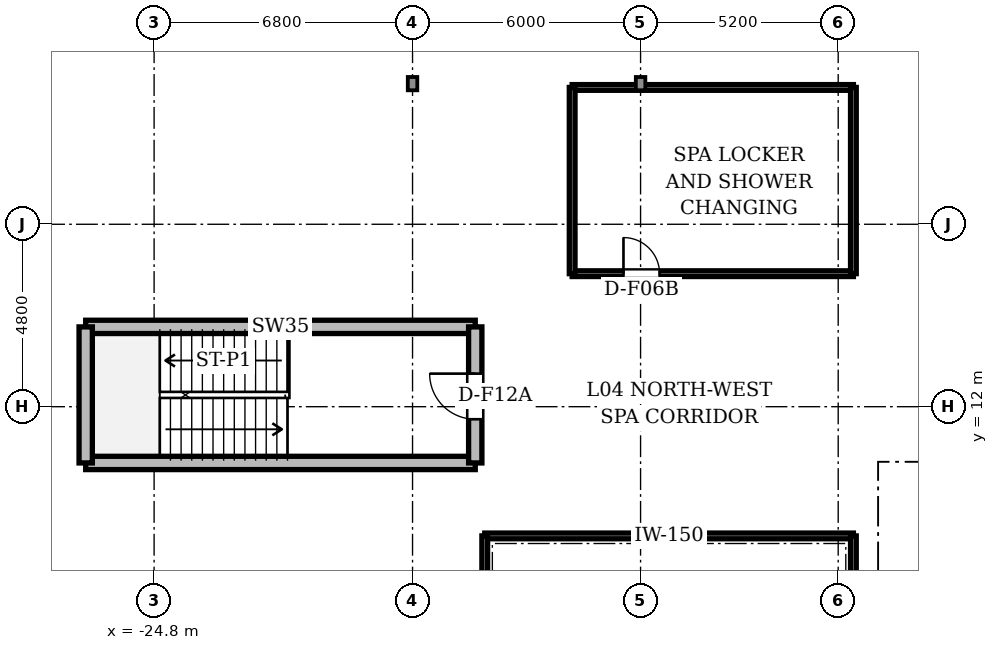
"""IFC4 building model, lengths in metres.
Left out: names, types, materials, properties, quantities, classifications, styles, units other than length and angle.
Written with IfcOpenShell. Run it as: python <this file> out.ifc"""

import sys

from ifc_helpers import new_model, si_unit, direction, frame, frame_2d, origin, origin_2d, place, context, subcontext, project, spatial, rectangle, i_section, extrude, source, transform, mapped, element, fill, save


model = new_model("IFC4")
c1 = context("Model", 3, precision=1e-05, world=origin(), true_north=direction((0.0, 1.0)))
c2 = subcontext(c1, "Body", "Model", "MODEL_VIEW")
j1 = project(units=[si_unit("LENGTHUNIT", "METRE"), si_unit("PLANEANGLEUNIT", "RADIAN")], contexts=[c1])
p1 = place(None, origin())
s1 = spatial("IfcSite", under=j1, at=p1, CompositionType="ELEMENT")
p2 = place(p1, origin())
s2 = spatial("IfcBuilding", under=s1, at=p2, CompositionType="ELEMENT")
p3 = place(p2, frame((0.0, 0.0, 18.6)))
s3 = spatial("IfcBuildingStorey", under=s2, at=p3, CompositionType="ELEMENT", Elevation=18.6)
m1 = source(origin(), c2, "Body", "SweptSolid", [
    extrude(i_section(OverallWidth=0.25, OverallDepth=0.35, WebThickness=0.012, FlangeThickness=0.012, FilletRadius=0.012, at=origin_2d()), origin(), (0.0, 0.0, 1.0), 4.26),
])
for number, where, z_axis, x_axis in (
    (1, (-18.0, 20.5, 0.0), (0.0, 0.0, 1.0), (1.0, 0.0, 0.0)),
    (2, (-12.0, 20.5, 0.0), (0.0, 0.0, 1.0), (1.0, 0.0, 0.0)),
):
    element("IfcColumn", number, at=place(p3, frame(where, z_axis=z_axis, x_axis=x_axis)), inside=s3, PredefinedType="COLUMN", context=c2, shape_type="MappedRepresentation", body=[
        mapped(m1, transform((0.0, 0.0, 0.0), scale=1.0)),
    ])
for number, where, z_axis, x_axis in (
    (3, (-26.6, 14.1, 0.0), (0.0, 0.0, 1.0), (1.0, 0.0, 0.0)),
    (4, (-26.6, 10.52, 0.0), (0.0, 0.0, 1.0), (1.0, 0.0, 0.0)),
):
    element("IfcWall", number, at=place(p3, frame(where, z_axis=z_axis, x_axis=x_axis)), inside=s3, PredefinedType="SHEAR", context=c2, shape_type="SweptSolid", body=[
        extrude(rectangle(XDim=10.25, YDim=0.35, at=frame_2d((5.125, 0.0))), origin(), (0.0, 0.0, 1.0), 4.26),
    ])
p4 = place(p3, frame((-26.6, 10.52, 0.0), z_axis=(0.0, 0.0, 1.0), x_axis=(0.0, 1.0, 0.0)))
e5 = element("IfcWall", 5, at=p4, inside=s3, PredefinedType="SHEAR", context=c2, shape_type="SweptSolid", body=[
    extrude(rectangle(XDim=3.58, YDim=0.35, at=frame_2d((1.79, 0.0))), origin(), (0.0, 0.0, 1.0), 4.26),
])
p5 = place(p3, frame((-16.35, 10.52, 0.0), z_axis=(0.0, 0.0, 1.0), x_axis=(0.0, 1.0, 0.0)))
e6 = element("IfcWall", 6, at=p5, inside=s3, PredefinedType="SHEAR", context=c2, shape_type="SweptSolid", body=[
    extrude(rectangle(XDim=3.58, YDim=0.35, at=frame_2d((1.79, 0.0))), origin(), (0.0, 0.0, 1.0), 4.26),
])
p6 = place(p5, frame((1.15, 0.0, 0.0)))
e7 = element("IfcOpeningElement", 7, at=p6, cuts=e6, PredefinedType="OPENING", context=c2, shape_type="SweptSolid", body=[
    extrude(rectangle(XDim=1.2, YDim=2.2, at=frame_2d((0.6, 1.1))), frame((0.0, 0.185, 0.0), z_axis=(0.0, -1.0, 0.0), x_axis=(1.0, 0.0, 0.0)), (0.0, 0.0, 1.0), 0.37),
])
p7 = place(p3, frame((-16.1, 8.6, 0.0), z_axis=(0.0, 0.0, 1.0), x_axis=(1.0, 0.0, 0.0)))
e8 = element("IfcWall", 8, at=p7, inside=s3, PredefinedType="PARTITIONING", context=c2, shape_type="SweptSolid", body=[
    extrude(rectangle(XDim=9.7, YDim=0.15, at=frame_2d((4.85, 0.0))), origin(), (0.0, 0.0, 1.0), 3.81),
])
for number, where, z_axis, x_axis in (
    (9, (-16.1, 1.2, 0.0), (0.0, 0.0, 1.0), (0.0, 1.0, 0.0)),
    (10, (-6.4, 1.2, 0.0), (0.0, 0.0, 1.0), (0.0, 1.0, 0.0)),
):
    element("IfcWall", number, at=place(p3, frame(where, z_axis=z_axis, x_axis=x_axis)), inside=s3, PredefinedType="PARTITIONING", context=c2, shape_type="SweptSolid", body=[
        extrude(rectangle(XDim=7.4, YDim=0.15, at=frame_2d((3.7, 0.0))), origin(), (0.0, 0.0, 1.0), 3.81),
    ])
p8 = place(p3, frame((-13.8, 20.4, 0.0), z_axis=(0.0, 0.0, 1.0), x_axis=(1.0, 0.0, 0.0)))
e11 = element("IfcWall", 11, at=p8, inside=s3, PredefinedType="PARTITIONING", context=c2, shape_type="SweptSolid", body=[
    extrude(rectangle(XDim=7.4, YDim=0.15, at=frame_2d((3.7, 0.0))), origin(), (0.0, 0.0, 1.0), 3.67),
])
p9 = place(p3, frame((-13.8, 15.5, 0.0), z_axis=(0.0, 0.0, 1.0), x_axis=(1.0, 0.0, 0.0)))
e12 = element("IfcWall", 12, at=p9, inside=s3, PredefinedType="PARTITIONING", context=c2, shape_type="SweptSolid", body=[
    extrude(rectangle(XDim=7.4, YDim=0.15, at=frame_2d((3.7, 0.0))), origin(), (0.0, 0.0, 1.0), 3.81),
])
p10 = place(p9, frame((1.35, 0.0, 0.0)))
e13 = element("IfcOpeningElement", 13, at=p10, cuts=e12, PredefinedType="OPENING", context=c2, shape_type="SweptSolid", body=[
    extrude(rectangle(XDim=0.95, YDim=2.15, at=frame_2d((0.475, 1.075))), frame((0.0, 0.085, 0.0), z_axis=(0.0, -1.0, 0.0), x_axis=(1.0, 0.0, 0.0)), (0.0, 0.0, 1.0), 0.17),
])
for number, where, z_axis, x_axis in (
    (14, (-13.8, 15.5, 0.0), (0.0, 0.0, 1.0), (0.0, 1.0, 0.0)),
    (15, (-6.4, 15.5, 0.0), (0.0, 0.0, 1.0), (0.0, 1.0, 0.0)),
):
    element("IfcWall", number, at=place(p3, frame(where, z_axis=z_axis, x_axis=x_axis)), inside=s3, PredefinedType="PARTITIONING", context=c2, shape_type="SweptSolid", body=[
        extrude(rectangle(XDim=4.9, YDim=0.15, at=frame_2d((2.45, 0.0))), origin(), (0.0, 0.0, 1.0), 3.81),
    ])
m2 = source(origin(), c2, "Body", "SweptSolid", [
    extrude(rectangle(XDim=1.2, YDim=0.05, at=origin_2d()), origin(), (0.0, 0.0, 1.0), 2.2),
])
p11 = place(p6, frame((0.6, 0.0, 0.0)))
e16 = element("IfcDoor", 16, at=p11, inside=s3, OperationType="SINGLE_SWING_RIGHT", PredefinedType="DOOR", context=c2, shape_type="MappedRepresentation", body=[
    mapped(m2, transform((0.0, 0.0, 0.0), scale=1.0)),
])
fill(e7, e16)
m3 = source(origin(), c2, "Body", "SweptSolid", [
    extrude(rectangle(XDim=0.95, YDim=0.05, at=origin_2d()), origin(), (0.0, 0.0, 1.0), 2.15),
])
p12 = place(p10, frame((0.475, 0.0, 0.0)))
e17 = element("IfcDoor", 17, at=p12, inside=s3, OperationType="SINGLE_SWING_LEFT", PredefinedType="DOOR", context=c2, shape_type="MappedRepresentation", body=[
    mapped(m3, transform((0.0, 0.0, 0.0), scale=1.0)),
])
fill(e13, e17)
save(model, sys.argv[1])
